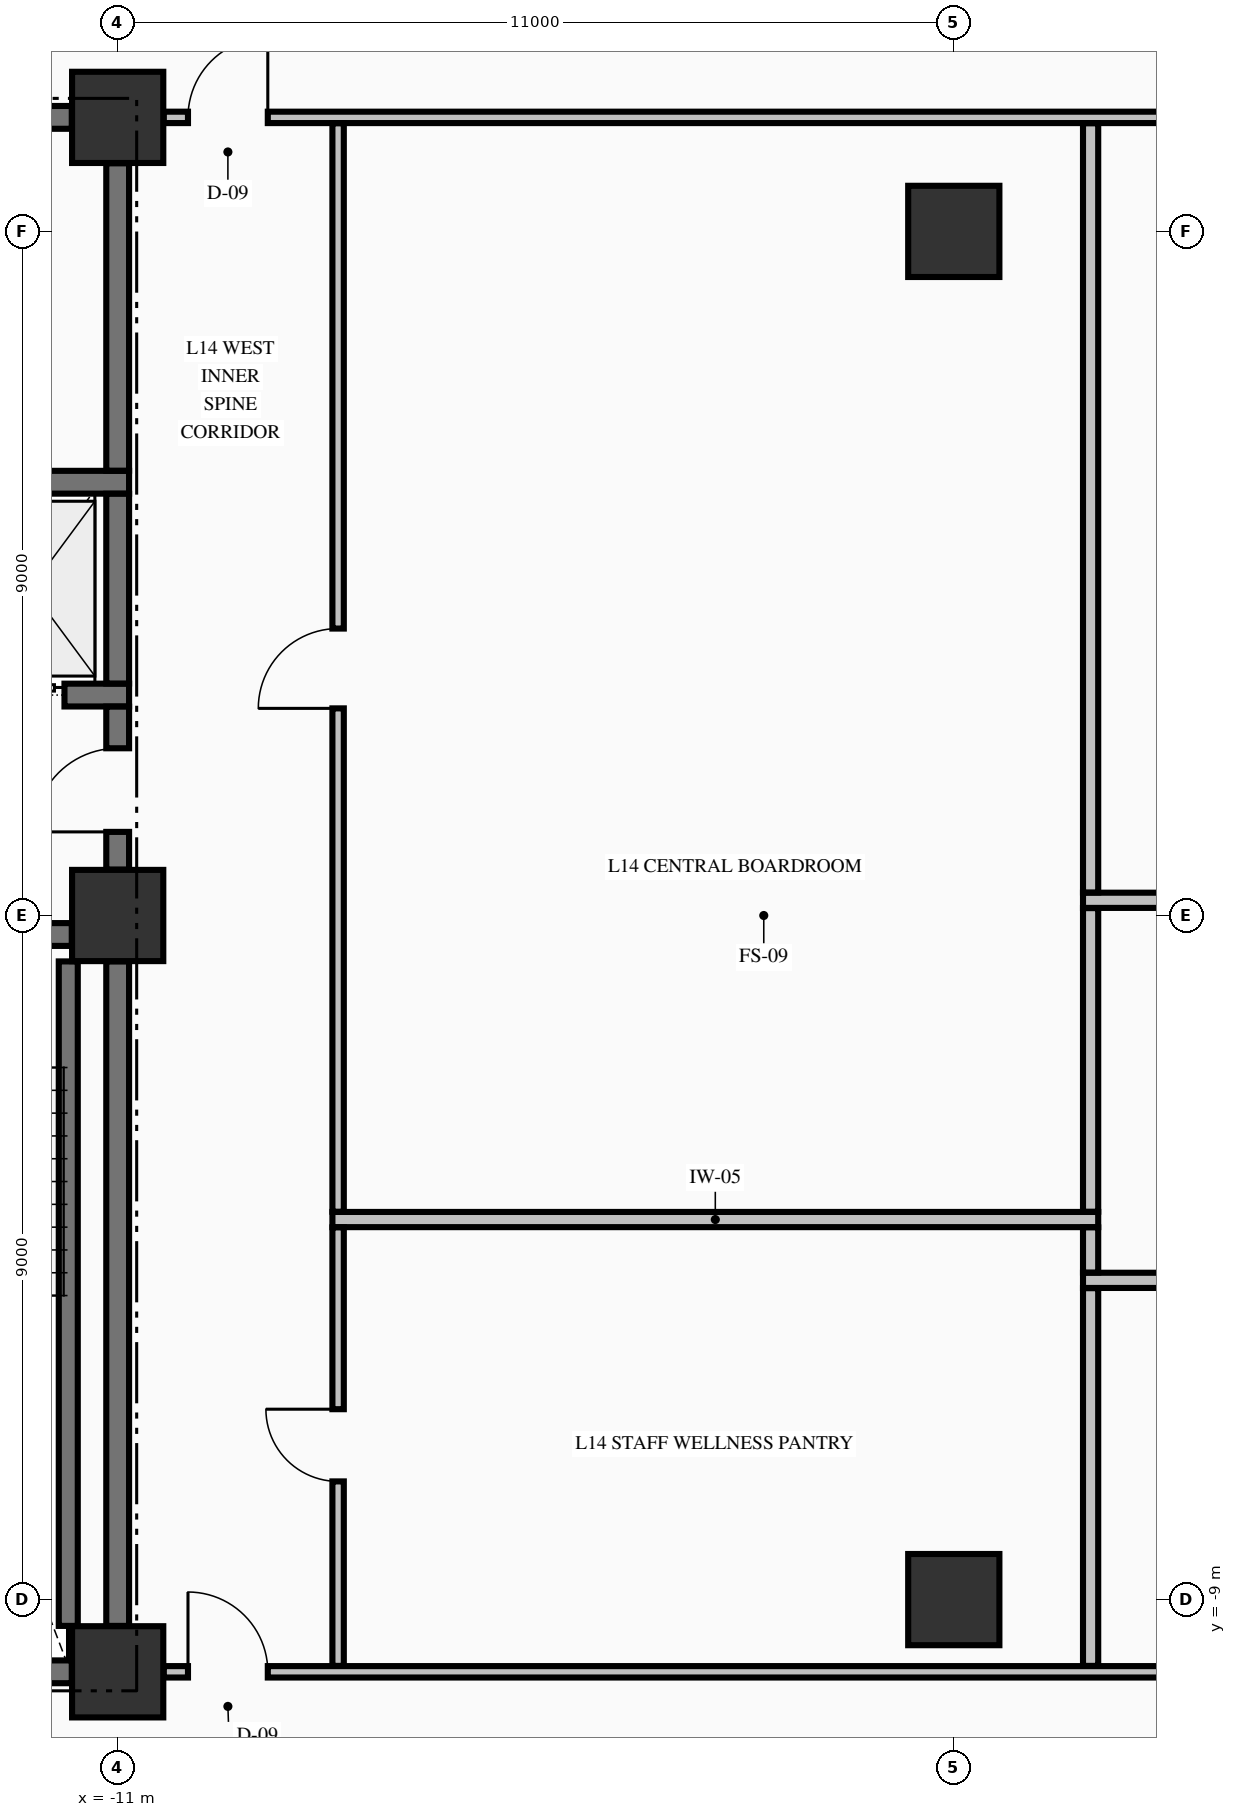
"""IFC4 building model, lengths in metres.
Left out: names, types, materials, properties, quantities, classifications, styles, units other than length and angle.
Written with IfcOpenShell. Run it as: python <this file> out.ifc"""

import sys

from ifc_helpers import new_model, si_unit, direction, frame, frame_2d, origin, origin_2d, place, context, subcontext, project, spatial, rectangle, extrude, element, fill, save


model = new_model("IFC4")
c1 = context("Model", 3, precision=1e-05, world=origin(), true_north=direction((0.0, 1.0)))
c2 = subcontext(c1, "Body", "Model", "MODEL_VIEW")
j1 = project(units=[si_unit("LENGTHUNIT", "METRE"), si_unit("PLANEANGLEUNIT", "RADIAN")], contexts=[c1])
p1 = place(None, origin())
s1 = spatial("IfcSite", under=j1, at=p1, CompositionType="ELEMENT")
p2 = place(p1, origin())
s2 = spatial("IfcBuilding", under=s1, at=p2, CompositionType="ELEMENT")
p3 = place(p2, frame((0.0, 0.0, 60.76)))
s3 = spatial("IfcBuildingStorey", under=s2, at=p3, CompositionType="ELEMENT", Elevation=60.76)
for number, where, z_axis, x_axis in (
    (1, (-11.0, -9.95, -0.3), (0.0, 0.0, 1.0), (1.0, 0.0, 0.0)),
    (2, (-11.0, 0.0, -0.3), (0.0, 0.0, 1.0), (1.0, 0.0, 0.0)),
    (3, (-11.0, 10.5, -0.3), (0.0, 0.0, 1.0), (1.0, 0.0, 0.0)),
    (4, (0.0, -9.0, -0.3), (0.0, 0.0, 1.0), (1.0, 0.0, 0.0)),
    (5, (0.0, 9.0, -0.3), (0.0, 0.0, 1.0), (1.0, 0.0, 0.0)),
):
    element("IfcColumn", number, at=place(p3, frame(where, z_axis=z_axis, x_axis=x_axis)), inside=s3, PredefinedType="COLUMN", context=c2, shape_type="SweptSolid", body=[
        extrude(rectangle(XDim=1.2, YDim=1.2, at=origin_2d()), origin(), (0.0, 0.0, 1.0), 3.62),
    ])
p4 = place(p3, frame((-14.7, -9.95, 0.0), z_axis=(0.0, 0.0, 1.0), x_axis=(1.0, 0.0, 0.0)))
e6 = element("IfcWall", 6, at=p4, inside=s3, PredefinedType="SHEAR", context=c2, shape_type="SweptSolid", body=[
    extrude(rectangle(XDim=3.096, YDim=0.3, at=frame_2d((1.548, 0.0))), origin(), (0.0, 0.0, 1.0), 3.32),
])
p5 = place(p3, frame((-19.396, -0.25, 0.0), z_axis=(0.0, 0.0, 1.0), x_axis=(1.0, 0.0, 0.0)))
e7 = element("IfcWall", 7, at=p5, inside=s3, PredefinedType="SHEAR", context=c2, shape_type="SweptSolid", body=[
    extrude(rectangle(XDim=7.792, YDim=0.3, at=frame_2d((3.896, 0.0))), origin(), (0.0, 0.0, 1.0), 3.32),
])
p6 = place(p5, frame((5.696, 0.0, 0.0)))
e8 = element("IfcOpeningElement", 8, at=p6, cuts=e7, PredefinedType="OPENING", context=c2, shape_type="SweptSolid", body=[
    extrude(rectangle(XDim=1.1, YDim=2.15, at=frame_2d((0.55, 1.075))), frame((0.0, 0.16, 0.0), z_axis=(0.0, -1.0, 0.0), x_axis=(1.0, 0.0, 0.0)), (0.0, 0.0, 1.0), 0.32),
])
p7 = place(p3, frame((-14.875, 2.9, 0.0), z_axis=(0.0, 0.0, 1.0), x_axis=(1.0, 0.0, 0.0)))
e9 = element("IfcWall", 9, at=p7, inside=s3, PredefinedType="SHEAR", context=c2, shape_type="SweptSolid", body=[
    extrude(rectangle(XDim=4.025, YDim=0.3, at=frame_2d((2.012, 0.0))), origin(), (0.0, 0.0, 1.0), 3.32),
])
p8 = place(p7, frame((2.075, 0.0, 0.0)))
e10 = element("IfcOpeningElement", 10, at=p8, cuts=e9, PredefinedType="OPENING", context=c2, shape_type="SweptSolid", body=[
    extrude(rectangle(XDim=1.1, YDim=2.2, at=frame_2d((0.55, 1.1))), frame((0.0, 0.16, 0.0), z_axis=(0.0, -1.0, 0.0), x_axis=(1.0, 0.0, 0.0)), (0.0, 0.0, 1.0), 0.32),
])
p9 = place(p3, frame((-14.875, 5.7, 0.0), z_axis=(0.0, 0.0, 1.0), x_axis=(1.0, 0.0, 0.0)))
e11 = element("IfcWall", 11, at=p9, inside=s3, PredefinedType="SHEAR", context=c2, shape_type="SweptSolid", body=[
    extrude(rectangle(XDim=4.025, YDim=0.3, at=frame_2d((2.012, 0.0))), origin(), (0.0, 0.0, 1.0), 3.32),
])
p10 = place(p3, frame((-14.7, 10.5, 0.0), z_axis=(0.0, 0.0, 1.0), x_axis=(1.0, 0.0, 0.0)))
e12 = element("IfcWall", 12, at=p10, inside=s3, PredefinedType="SHEAR", context=c2, shape_type="SweptSolid", body=[
    extrude(rectangle(XDim=3.096, YDim=0.3, at=frame_2d((1.548, 0.0))), origin(), (0.0, 0.0, 1.0), 3.32),
])
p11 = place(p10, frame((0.775, 0.0, 0.0)))
e13 = element("IfcOpeningElement", 13, at=p11, cuts=e12, PredefinedType="OPENING", context=c2, shape_type="SweptSolid", body=[
    extrude(rectangle(XDim=0.95, YDim=2.15, at=frame_2d((0.475, 1.075))), frame((0.0, 0.16, 0.0), z_axis=(0.0, -1.0, 0.0), x_axis=(1.0, 0.0, 0.0)), (0.0, 0.0, 1.0), 0.32),
])
p12 = place(p3, frame((-10.394, -9.95, 0.0), z_axis=(0.0, 0.0, 1.0), x_axis=(1.0, 0.0, 0.0)))
e14 = element("IfcWall", 14, at=p12, inside=s3, PredefinedType="PARTITIONING", context=c2, shape_type="SweptSolid", body=[
    extrude(rectangle(XDim=20.788, YDim=0.15, at=frame_2d((10.394, 0.0))), origin(), (0.0, 0.0, 1.0), 3.32),
])
p13 = place(p12, frame((0.319, 0.0, 0.0)))
e15 = element("IfcOpeningElement", 15, at=p13, cuts=e14, PredefinedType="OPENING", context=c2, shape_type="SweptSolid", body=[
    extrude(rectangle(XDim=1.05, YDim=2.15, at=frame_2d((0.525, 1.075))), frame((0.0, 0.085, 0.0), z_axis=(0.0, -1.0, 0.0), x_axis=(1.0, 0.0, 0.0)), (0.0, 0.0, 1.0), 0.17),
])
p14 = place(p12, frame((19.419, 0.0, 0.0)))
e16 = element("IfcOpeningElement", 16, at=p14, cuts=e14, PredefinedType="OPENING", context=c2, shape_type="SweptSolid", body=[
    extrude(rectangle(XDim=1.05, YDim=2.15, at=frame_2d((0.525, 1.075))), frame((0.0, 0.085, 0.0), z_axis=(0.0, -1.0, 0.0), x_axis=(1.0, 0.0, 0.0)), (0.0, 0.0, 1.0), 0.17),
])
p15 = place(p12, frame((13.369, 0.0, 0.0)))
e17 = element("IfcOpeningElement", 17, at=p15, cuts=e14, PredefinedType="OPENING", context=c2, shape_type="SweptSolid", body=[
    extrude(rectangle(XDim=0.95, YDim=2.15, at=frame_2d((0.475, 1.075))), frame((0.0, 0.085, 0.0), z_axis=(0.0, -1.0, 0.0), x_axis=(1.0, 0.0, 0.0)), (0.0, 0.0, 1.0), 0.17),
])
p16 = place(p3, frame((1.7, -4.8, 0.0), z_axis=(0.0, 0.0, 1.0), x_axis=(1.0, 0.0, 0.0)))
e18 = element("IfcWall", 18, at=p16, inside=s3, PredefinedType="PARTITIONING", context=c2, shape_type="SweptSolid", body=[
    extrude(rectangle(XDim=6.475, YDim=0.2, at=frame_2d((3.238, 0.0))), origin(), (0.0, 0.0, 1.0), 3.32),
])
p17 = place(p3, frame((-8.175, -4.0, 0.0), z_axis=(0.0, 0.0, 1.0), x_axis=(1.0, 0.0, 0.0)))
e19 = element("IfcWall", 19, at=p17, inside=s3, PredefinedType="PARTITIONING", context=c2, shape_type="SweptSolid", body=[
    extrude(rectangle(XDim=10.075, YDim=0.2, at=frame_2d((5.038, 0.0))), origin(), (0.0, 0.0, 1.0), 3.32),
])
p18 = place(p3, frame((1.7, 0.2, 0.0), z_axis=(0.0, 0.0, 1.0), x_axis=(1.0, 0.0, 0.0)))
e20 = element("IfcWall", 20, at=p18, inside=s3, PredefinedType="PARTITIONING", context=c2, shape_type="SweptSolid", body=[
    extrude(rectangle(XDim=6.475, YDim=0.2, at=frame_2d((3.238, 0.0))), origin(), (0.0, 0.0, 1.0), 3.32),
])
p19 = place(p3, frame((-10.394, 10.5, 0.0), z_axis=(0.0, 0.0, 1.0), x_axis=(1.0, 0.0, 0.0)))
e21 = element("IfcWall", 21, at=p19, inside=s3, PredefinedType="PARTITIONING", context=c2, shape_type="SweptSolid", body=[
    extrude(rectangle(XDim=20.788, YDim=0.15, at=frame_2d((10.394, 0.0))), origin(), (0.0, 0.0, 1.0), 3.32),
])
p20 = place(p19, frame((0.319, 0.0, 0.0)))
e22 = element("IfcOpeningElement", 22, at=p20, cuts=e21, PredefinedType="OPENING", context=c2, shape_type="SweptSolid", body=[
    extrude(rectangle(XDim=1.05, YDim=2.15, at=frame_2d((0.525, 1.075))), frame((0.0, 0.085, 0.0), z_axis=(0.0, -1.0, 0.0), x_axis=(1.0, 0.0, 0.0)), (0.0, 0.0, 1.0), 0.17),
])
p21 = place(p19, frame((19.419, 0.0, 0.0)))
e23 = element("IfcOpeningElement", 23, at=p21, cuts=e21, PredefinedType="OPENING", context=c2, shape_type="SweptSolid", body=[
    extrude(rectangle(XDim=1.05, YDim=2.15, at=frame_2d((0.525, 1.075))), frame((0.0, 0.085, 0.0), z_axis=(0.0, -1.0, 0.0), x_axis=(1.0, 0.0, 0.0)), (0.0, 0.0, 1.0), 0.17),
])
p22 = place(p3, frame((-11.65, -9.346, 0.0), z_axis=(0.0, 0.0, 1.0), x_axis=(0.0, 1.0, 0.0)))
e24 = element("IfcWall", 24, at=p22, inside=s3, PredefinedType="SOLIDWALL", context=c2, shape_type="SweptSolid", body=[
    extrude(rectangle(XDim=8.742, YDim=0.25, at=frame_2d((4.371, 0.0))), origin(), (0.0, 0.0, 1.0), 3.32),
])
p23 = place(p3, frame((-11.0, -9.346, 0.0), z_axis=(0.0, 0.0, 1.0), x_axis=(0.0, 1.0, 0.0)))
e25 = element("IfcWall", 25, at=p23, inside=s3, PredefinedType="SHEAR", context=c2, shape_type="SweptSolid", body=[
    extrude(rectangle(XDim=8.742, YDim=0.3, at=frame_2d((4.371, 0.0))), origin(), (0.0, 0.0, 1.0), 3.32),
])
p24 = place(p3, frame((-11.0, 0.604, 0.0), z_axis=(0.0, 0.0, 1.0), x_axis=(0.0, 1.0, 0.0)))
e26 = element("IfcWall", 26, at=p24, inside=s3, PredefinedType="SHEAR", context=c2, shape_type="SweptSolid", body=[
    extrude(rectangle(XDim=2.144, YDim=0.3, at=frame_2d((1.072, 0.0))), origin(), (0.0, 0.0, 1.0), 3.32),
])
p25 = place(p24, frame((0.496, 0.0, 0.0)))
e27 = element("IfcOpeningElement", 27, at=p25, cuts=e26, PredefinedType="OPENING", context=c2, shape_type="SweptSolid", body=[
    extrude(rectangle(XDim=1.1, YDim=2.15, at=frame_2d((0.55, 1.075))), frame((0.0, 0.16, 0.0), z_axis=(0.0, -1.0, 0.0), x_axis=(1.0, 0.0, 0.0)), (0.0, 0.0, 1.0), 0.32),
])
p26 = place(p3, frame((-11.0, 3.052, 0.0), z_axis=(0.0, 0.0, 1.0), x_axis=(0.0, 1.0, 0.0)))
e28 = element("IfcWall", 28, at=p26, inside=s3, PredefinedType="SHEAR", context=c2, shape_type="SweptSolid", body=[
    extrude(rectangle(XDim=2.496, YDim=0.3, at=frame_2d((1.248, 0.0))), origin(), (0.0, 0.0, 1.0), 3.32),
])
p27 = place(p3, frame((-11.0, 5.852, 0.0), z_axis=(0.0, 0.0, 1.0), x_axis=(0.0, 1.0, 0.0)))
e29 = element("IfcWall", 29, at=p27, inside=s3, PredefinedType="SHEAR", context=c2, shape_type="SweptSolid", body=[
    extrude(rectangle(XDim=4.044, YDim=0.3, at=frame_2d((2.022, 0.0))), origin(), (0.0, 0.0, 1.0), 3.32),
])
p28 = place(p3, frame((-8.1, -9.872, 0.0), z_axis=(0.0, 0.0, 1.0), x_axis=(0.0, 1.0, 0.0)))
e30 = element("IfcWall", 30, at=p28, inside=s3, PredefinedType="PARTITIONING", context=c2, shape_type="SweptSolid", body=[
    extrude(rectangle(XDim=5.769, YDim=0.15, at=frame_2d((2.885, 0.0))), origin(), (0.0, 0.0, 1.0), 3.32),
])
p29 = place(p28, frame((2.427, 0.0, 0.0)))
e31 = element("IfcOpeningElement", 31, at=p29, cuts=e30, PredefinedType="OPENING", context=c2, shape_type="SweptSolid", body=[
    extrude(rectangle(XDim=0.95, YDim=2.15, at=frame_2d((0.475, 1.075))), frame((0.0, 0.085, 0.0), z_axis=(0.0, -1.0, 0.0), x_axis=(1.0, 0.0, 0.0)), (0.0, 0.0, 1.0), 0.17),
])
p30 = place(p3, frame((-8.1, -3.897, 0.0), z_axis=(0.0, 0.0, 1.0), x_axis=(0.0, 1.0, 0.0)))
e32 = element("IfcWall", 32, at=p30, inside=s3, PredefinedType="PARTITIONING", context=c2, shape_type="SweptSolid", body=[
    extrude(rectangle(XDim=14.319, YDim=0.15, at=frame_2d((7.16, 0.0))), origin(), (0.0, 0.0, 1.0), 3.32),
])
p31 = place(p30, frame((6.622, 0.0, 0.0)))
e33 = element("IfcOpeningElement", 33, at=p31, cuts=e32, PredefinedType="OPENING", context=c2, shape_type="SweptSolid", body=[
    extrude(rectangle(XDim=1.05, YDim=2.15, at=frame_2d((0.525, 1.075))), frame((0.0, 0.085, 0.0), z_axis=(0.0, -1.0, 0.0), x_axis=(1.0, 0.0, 0.0)), (0.0, 0.0, 1.0), 0.17),
])
p32 = place(p3, frame((1.8, -9.872, 0.0), z_axis=(0.0, 0.0, 1.0), x_axis=(0.0, 1.0, 0.0)))
e34 = element("IfcWall", 34, at=p32, inside=s3, PredefinedType="PARTITIONING", context=c2, shape_type="SweptSolid", body=[
    extrude(rectangle(XDim=4.969, YDim=0.2, at=frame_2d((2.484, 0.0))), origin(), (0.0, 0.0, 1.0), 3.32),
])
p33 = place(p3, frame((1.8, -4.697, 0.0), z_axis=(0.0, 0.0, 1.0), x_axis=(0.0, 1.0, 0.0)))
e35 = element("IfcWall", 35, at=p33, inside=s3, PredefinedType="PARTITIONING", context=c2, shape_type="SweptSolid", body=[
    extrude(rectangle(XDim=0.594, YDim=0.2, at=frame_2d((0.297, 0.0))), origin(), (0.0, 0.0, 1.0), 3.32),
])
p34 = place(p3, frame((1.8, -3.897, 0.0), z_axis=(0.0, 0.0, 1.0), x_axis=(0.0, 1.0, 0.0)))
e36 = element("IfcWall", 36, at=p34, inside=s3, PredefinedType="PARTITIONING", context=c2, shape_type="SweptSolid", body=[
    extrude(rectangle(XDim=3.994, YDim=0.2, at=frame_2d((1.997, 0.0))), origin(), (0.0, 0.0, 1.0), 3.32),
])
p35 = place(p3, frame((1.8, 0.303, 0.0), z_axis=(0.0, 0.0, 1.0), x_axis=(0.0, 1.0, 0.0)))
e37 = element("IfcWall", 37, at=p35, inside=s3, PredefinedType="PARTITIONING", context=c2, shape_type="SweptSolid", body=[
    extrude(rectangle(XDim=10.119, YDim=0.2, at=frame_2d((5.06, 0.0))), origin(), (0.0, 0.0, 1.0), 3.32),
])
p36 = place(p25, origin())
e38 = element("IfcDoor", 38, at=p36, inside=s3, OperationType="SINGLE_SWING_LEFT", PredefinedType="DOOR", context=c2, shape_type="SweptSolid", body=[
    extrude(rectangle(XDim=1.1, YDim=2.15, at=frame_2d((0.55, 1.075))), frame((0.0, 0.025, 0.0), z_axis=(0.0, -1.0, 0.0), x_axis=(1.0, 0.0, 0.0)), (0.0, 0.0, 1.0), 0.05),
])
fill(e27, e38)
p37 = place(p8, origin())
e39 = element("IfcDoor", 39, at=p37, inside=s3, OperationType="SLIDING_TO_LEFT", PredefinedType="DOOR", context=c2, shape_type="SweptSolid", body=[
    extrude(rectangle(XDim=1.1, YDim=2.2, at=frame_2d((0.55, 1.1))), frame((0.0, 0.025, 0.0), z_axis=(0.0, -1.0, 0.0), x_axis=(1.0, 0.0, 0.0)), (0.0, 0.0, 1.0), 0.05),
])
fill(e10, e39)
p38 = place(p20, origin())
e40 = element("IfcDoor", 40, at=p38, inside=s3, OperationType="SINGLE_SWING_RIGHT", PredefinedType="DOOR", context=c2, shape_type="SweptSolid", body=[
    extrude(rectangle(XDim=1.05, YDim=2.15, at=frame_2d((0.525, 1.075))), frame((0.0, 0.025, 0.0), z_axis=(0.0, -1.0, 0.0), x_axis=(1.0, 0.0, 0.0)), (0.0, 0.0, 1.0), 0.05),
])
fill(e22, e40)
p39 = place(p13, origin())
e41 = element("IfcDoor", 41, at=p39, inside=s3, OperationType="SINGLE_SWING_LEFT", PredefinedType="DOOR", context=c2, shape_type="SweptSolid", body=[
    extrude(rectangle(XDim=1.05, YDim=2.15, at=frame_2d((0.525, 1.075))), frame((0.0, 0.025, 0.0), z_axis=(0.0, -1.0, 0.0), x_axis=(1.0, 0.0, 0.0)), (0.0, 0.0, 1.0), 0.05),
])
fill(e15, e41)
p40 = place(p31, origin())
e42 = element("IfcDoor", 42, at=p40, inside=s3, OperationType="SINGLE_SWING_LEFT", PredefinedType="DOOR", context=c2, shape_type="SweptSolid", body=[
    extrude(rectangle(XDim=1.05, YDim=2.15, at=frame_2d((0.525, 1.075))), frame((0.0, 0.025, 0.0), z_axis=(0.0, -1.0, 0.0), x_axis=(1.0, 0.0, 0.0)), (0.0, 0.0, 1.0), 0.05),
])
fill(e33, e42)
p41 = place(p29, origin())
e43 = element("IfcDoor", 43, at=p41, inside=s3, OperationType="SINGLE_SWING_RIGHT", PredefinedType="DOOR", context=c2, shape_type="SweptSolid", body=[
    extrude(rectangle(XDim=0.95, YDim=2.15, at=frame_2d((0.475, 1.075))), frame((0.0, 0.025, 0.0), z_axis=(0.0, -1.0, 0.0), x_axis=(1.0, 0.0, 0.0)), (0.0, 0.0, 1.0), 0.05),
])
fill(e31, e43)
save(model, sys.argv[1])
